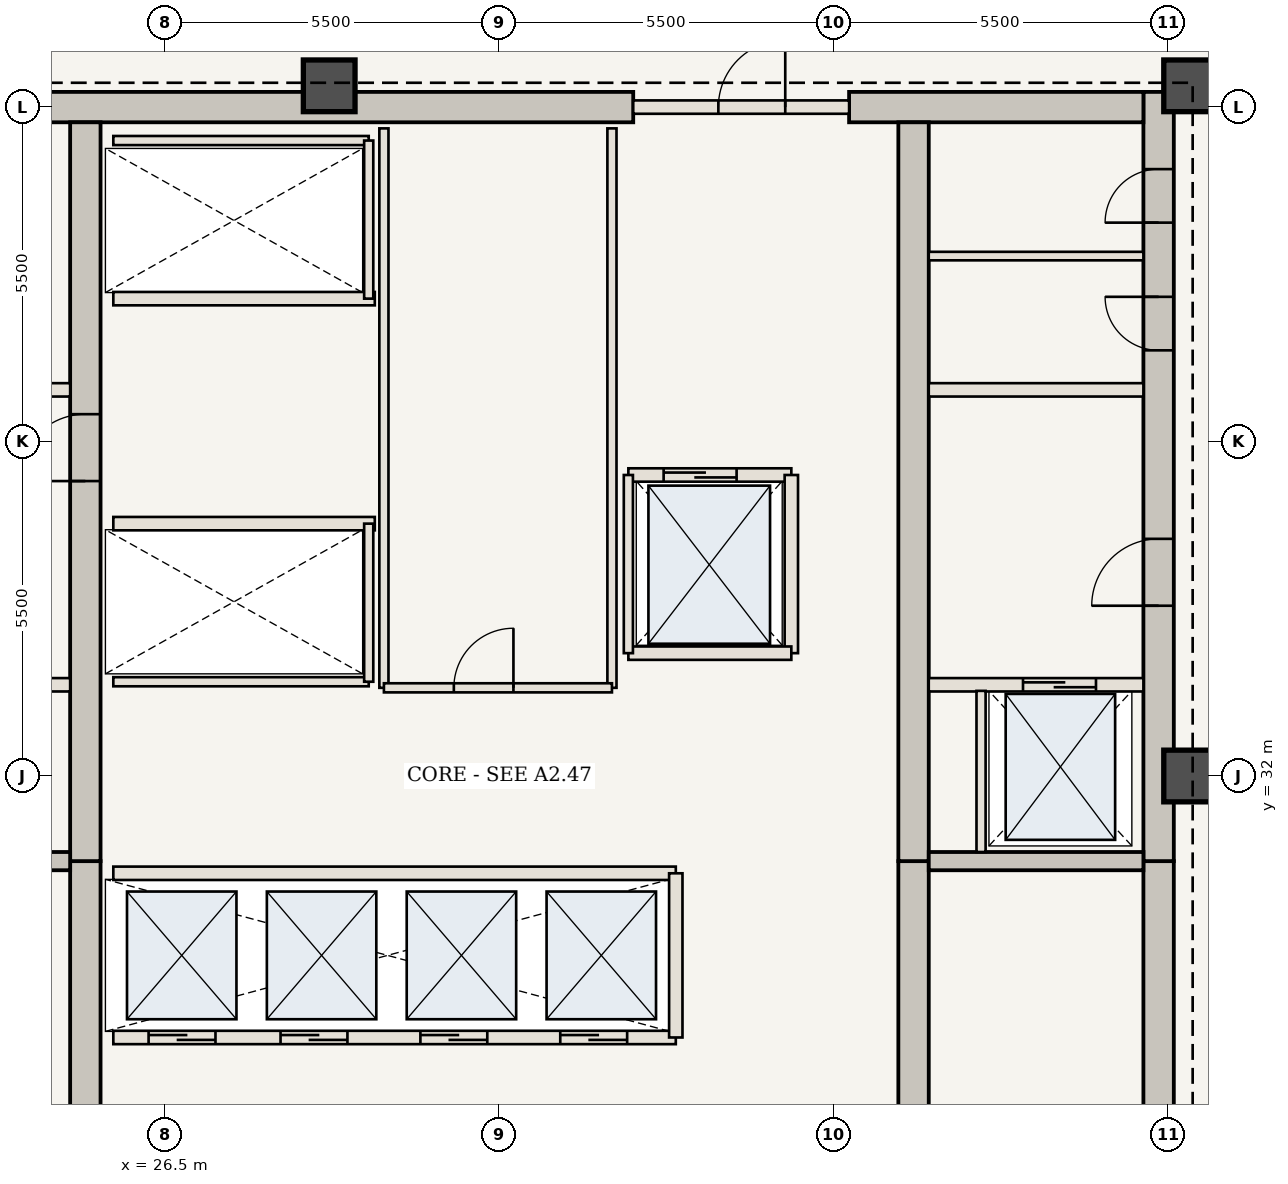
"""IFC4 building model, lengths in metres.
Left out: names, types, materials, properties, quantities, classifications, styles, units other than length and angle.
Written with IfcOpenShell. Run it as: python <this file> out.ifc"""

import sys

from ifc_helpers import new_model, si_unit, direction, frame, frame_2d, origin, origin_2d, place, context, subcontext, project, spatial, rectangle, extrude, element, fill, save


model = new_model("IFC4")
c1 = context("Model", 3, precision=1e-05, world=origin(), true_north=direction((0.0, 1.0)))
c2 = subcontext(c1, "Body", "Model", "MODEL_VIEW")
j1 = project(units=[si_unit("LENGTHUNIT", "METRE"), si_unit("PLANEANGLEUNIT", "RADIAN")], contexts=[c1])
p1 = place(None, origin())
s1 = spatial("IfcSite", under=j1, at=p1, CompositionType="ELEMENT")
p2 = place(p1, origin())
s2 = spatial("IfcBuilding", under=s1, at=p2, CompositionType="ELEMENT")
p3 = place(p2, frame((0.0, 0.0, 210.0)))
s3 = spatial("IfcBuildingStorey", under=s2, at=p3, CompositionType="ELEMENT", Elevation=210.0)
p4 = place(p3, frame((42.84, 20.7, 0.0), z_axis=(0.0, 0.0, 1.0), x_axis=(0.0, 1.0, 0.0)))
e1 = element("IfcWall", 1, at=p4, inside=s3, PredefinedType="SHEAR", context=c2, shape_type="SweptSolid", body=[
    extrude(rectangle(XDim=9.9, YDim=0.5, at=frame_2d((4.95, 0.0))), origin(), (0.0, 0.0, 1.0), 3.85),
])
p5 = place(p4, frame((1.05, 0.0, 0.0)))
e2 = element("IfcOpeningElement", 2, at=p5, cuts=e1, PredefinedType="OPENING", context=c2, shape_type="SweptSolid", body=[
    extrude(rectangle(XDim=1.15, YDim=2.15, at=frame_2d((0.575, 1.075))), frame((0.0, 0.26, 0.0), z_axis=(0.0, -1.0, 0.0), x_axis=(1.0, 0.0, 0.0)), (0.0, 0.0, 1.0), 0.52),
])
p6 = place(p3, frame((42.84, 30.6, 0.0), z_axis=(0.0, 0.0, 1.0), x_axis=(0.0, 1.0, 0.0)))
e3 = element("IfcWall", 3, at=p6, inside=s3, PredefinedType="SHEAR", context=c2, shape_type="SweptSolid", body=[
    extrude(rectangle(XDim=12.65, YDim=0.5, at=frame_2d((6.325, 0.0))), origin(), (0.0, 0.0, 1.0), 3.85),
])
p7 = place(p6, frame((4.2, 0.0, 0.0)))
e4 = element("IfcOpeningElement", 4, at=p7, cuts=e3, PredefinedType="OPENING", context=c2, shape_type="SweptSolid", body=[
    extrude(rectangle(XDim=1.1, YDim=2.15, at=frame_2d((0.55, 1.075))), frame((0.0, 0.26, 0.0), z_axis=(0.0, -1.0, 0.0), x_axis=(1.0, 0.0, 0.0)), (0.0, 0.0, 1.0), 0.52),
])
p8 = place(p6, frame((8.4, 0.0, 0.0)))
e5 = element("IfcOpeningElement", 5, at=p8, cuts=e3, PredefinedType="OPENING", context=c2, shape_type="SweptSolid", body=[
    extrude(rectangle(XDim=0.88, YDim=2.1, at=frame_2d((0.44, 1.05))), frame((0.0, 0.26, 0.0), z_axis=(0.0, -1.0, 0.0), x_axis=(1.0, 0.0, 0.0)), (0.0, 0.0, 1.0), 0.52),
])
p9 = place(p6, frame((10.5, 0.0, 0.0)))
e6 = element("IfcOpeningElement", 6, at=p9, cuts=e3, PredefinedType="OPENING", context=c2, shape_type="SweptSolid", body=[
    extrude(rectangle(XDim=0.88, YDim=2.1, at=frame_2d((0.44, 1.05))), frame((0.0, 0.26, 0.0), z_axis=(0.0, -1.0, 0.0), x_axis=(1.0, 0.0, 0.0)), (0.0, 0.0, 1.0), 0.52),
])
p10 = place(p3, frame((21.41, 43.0, 0.0), z_axis=(0.0, 0.0, 1.0), x_axis=(1.0, 0.0, 0.0)))
e7 = element("IfcWall", 7, at=p10, inside=s3, PredefinedType="SHEAR", context=c2, shape_type="SweptSolid", body=[
    extrude(rectangle(XDim=12.79, YDim=0.5, at=frame_2d((6.395, 0.0))), origin(), (0.0, 0.0, 1.0), 3.85),
])
p11 = place(p3, frame((37.75, 43.0, 0.0), z_axis=(0.0, 0.0, 1.0), x_axis=(1.0, 0.0, 0.0)))
e8 = element("IfcWall", 8, at=p11, inside=s3, PredefinedType="SHEAR", context=c2, shape_type="SweptSolid", body=[
    extrude(rectangle(XDim=4.84, YDim=0.5, at=frame_2d((2.42, 0.0))), origin(), (0.0, 0.0, 1.0), 3.85),
])
p12 = place(p3, frame((25.19, 21.2, 0.0), z_axis=(0.0, 0.0, 1.0), x_axis=(0.0, 1.0, 0.0)))
e9 = element("IfcWall", 9, at=p12, inside=s3, PredefinedType="SHEAR", context=c2, shape_type="SweptSolid", body=[
    extrude(rectangle(XDim=9.4, YDim=0.5, at=frame_2d((4.7, 0.0))), origin(), (0.0, 0.0, 1.0), 3.85),
])
p13 = place(p3, frame((25.19, 30.6, 0.0), z_axis=(0.0, 0.0, 1.0), x_axis=(0.0, 1.0, 0.0)))
e10 = element("IfcWall", 10, at=p13, inside=s3, PredefinedType="SHEAR", context=c2, shape_type="SweptSolid", body=[
    extrude(rectangle(XDim=12.15, YDim=0.5, at=frame_2d((6.075, 0.0))), origin(), (0.0, 0.0, 1.0), 3.85),
])
p14 = place(p13, frame((6.25, 0.0, 0.0)))
e11 = element("IfcOpeningElement", 11, at=p14, cuts=e10, PredefinedType="OPENING", context=c2, shape_type="SweptSolid", body=[
    extrude(rectangle(XDim=1.1, YDim=2.15, at=frame_2d((0.55, 1.075))), frame((0.0, 0.26, 0.0), z_axis=(0.0, -1.0, 0.0), x_axis=(1.0, 0.0, 0.0)), (0.0, 0.0, 1.0), 0.52),
])
p15 = place(p3, frame((38.81, 21.2, 0.0), z_axis=(0.0, 0.0, 1.0), x_axis=(0.0, 1.0, 0.0)))
e12 = element("IfcWall", 12, at=p15, inside=s3, PredefinedType="SHEAR", context=c2, shape_type="SweptSolid", body=[
    extrude(rectangle(XDim=9.4, YDim=0.5, at=frame_2d((4.7, 0.0))), origin(), (0.0, 0.0, 1.0), 3.85),
])
p16 = place(p3, frame((38.81, 30.6, 0.0), z_axis=(0.0, 0.0, 1.0), x_axis=(0.0, 1.0, 0.0)))
e13 = element("IfcWall", 13, at=p16, inside=s3, PredefinedType="SHEAR", context=c2, shape_type="SweptSolid", body=[
    extrude(rectangle(XDim=12.15, YDim=0.5, at=frame_2d((6.075, 0.0))), origin(), (0.0, 0.0, 1.0), 3.85),
])
for number, where, z_axis, x_axis in (
    (14, (43.35, 32.0, 0.0), (0.0, 0.0, 1.0), (1.0, 0.0, 0.0)),
    (15, (43.35, 43.35, 0.0), (0.0, 0.0, 1.0), (1.0, 0.0, 0.0)),
    (16, (29.2, 43.35, 0.0), (0.0, 0.0, 1.0), (1.0, 0.0, 0.0)),
):
    element("IfcColumn", number, at=place(p3, frame(where, z_axis=z_axis, x_axis=x_axis)), inside=s3, PredefinedType="COLUMN", context=c2, shape_type="SweptSolid", body=[
        extrude(rectangle(XDim=0.85, YDim=0.85, at=origin_2d()), origin(), (0.0, 0.0, 1.0), 3.85),
    ])
for number, where, z_axis, x_axis in (
    (17, (21.41, 30.6, 0.0), (0.0, 0.0, 1.0), (1.0, 0.0, 0.0)),
    (18, (39.06, 30.6, 0.0), (0.0, 0.0, 1.0), (1.0, 0.0, 0.0)),
):
    element("IfcWall", number, at=place(p3, frame(where, z_axis=z_axis, x_axis=x_axis)), inside=s3, PredefinedType="SHEAR", context=c2, shape_type="SweptSolid", body=[
        extrude(rectangle(XDim=3.53, YDim=0.3, at=frame_2d((1.765, 0.0))), origin(), (0.0, 0.0, 1.0), 3.685),
    ])
p17 = place(p3, frame((21.41, 33.5, 0.0), z_axis=(0.0, 0.0, 1.0), x_axis=(1.0, 0.0, 0.0)))
e19 = element("IfcWall", 19, at=p17, inside=s3, PredefinedType="STANDARD", context=c2, shape_type="SweptSolid", body=[
    extrude(rectangle(XDim=3.53, YDim=0.22, at=frame_2d((1.765, 0.0))), origin(), (0.0, 0.0, 1.0), 3.685),
])
p18 = place(p17, frame((0.75, 0.0, 0.0)))
e20 = element("IfcOpeningElement", 20, at=p18, cuts=e19, PredefinedType="OPENING", context=c2, shape_type="SweptSolid", body=[
    extrude(rectangle(XDim=1.2, YDim=2.2, at=frame_2d((0.6, 1.1))), frame((0.0, 0.12, 0.0), z_axis=(0.0, -1.0, 0.0), x_axis=(1.0, 0.0, 0.0)), (0.0, 0.0, 1.0), 0.24),
])
p19 = place(p3, frame((39.06, 33.5, 0.0), z_axis=(0.0, 0.0, 1.0), x_axis=(1.0, 0.0, 0.0)))
e21 = element("IfcWall", 21, at=p19, inside=s3, PredefinedType="STANDARD", context=c2, shape_type="SweptSolid", body=[
    extrude(rectangle(XDim=3.53, YDim=0.22, at=frame_2d((1.765, 0.0))), origin(), (0.0, 0.0, 1.0), 3.685),
])
p20 = place(p19, frame((1.55, 0.0, 0.0)))
e22 = element("IfcOpeningElement", 22, at=p20, cuts=e21, PredefinedType="OPENING", context=c2, shape_type="SweptSolid", body=[
    extrude(rectangle(XDim=1.2, YDim=2.2, at=frame_2d((0.6, 1.1))), frame((0.0, 0.12, 0.0), z_axis=(0.0, -1.0, 0.0), x_axis=(1.0, 0.0, 0.0)), (0.0, 0.0, 1.0), 0.24),
])
p21 = place(p3, frame((39.92, 30.75, 0.0), z_axis=(0.0, 0.0, 1.0), x_axis=(0.0, 1.0, 0.0)))
e23 = element("IfcWall", 23, at=p21, inside=s3, PredefinedType="STANDARD", context=c2, shape_type="SweptSolid", body=[
    extrude(rectangle(XDim=2.65, YDim=0.15, at=frame_2d((1.325, 0.0))), origin(), (0.0, 0.0, 1.0), 3.685),
])
for number, where, z_axis, x_axis in (
    (24, (21.41, 38.35, 0.0), (0.0, 0.0, 1.0), (1.0, 0.0, 0.0)),
    (25, (39.06, 38.35, 0.0), (0.0, 0.0, 1.0), (1.0, 0.0, 0.0)),
):
    element("IfcWall", number, at=place(p3, frame(where, z_axis=z_axis, x_axis=x_axis)), inside=s3, PredefinedType="STANDARD", context=c2, shape_type="SweptSolid", body=[
        extrude(rectangle(XDim=3.53, YDim=0.22, at=frame_2d((1.765, 0.0))), origin(), (0.0, 0.0, 1.0), 3.685),
    ])
p22 = place(p3, frame((39.06, 40.55, 0.0), z_axis=(0.0, 0.0, 1.0), x_axis=(1.0, 0.0, 0.0)))
e26 = element("IfcWall", 26, at=p22, inside=s3, PredefinedType="STANDARD", context=c2, shape_type="SweptSolid", body=[
    extrude(rectangle(XDim=3.53, YDim=0.14, at=frame_2d((1.765, 0.0))), origin(), (0.0, 0.0, 1.0), 3.685),
])
p23 = place(p3, frame((25.65, 27.7, 0.0), z_axis=(0.0, 0.0, 1.0), x_axis=(1.0, 0.0, 0.0)))
e27 = element("IfcWall", 27, at=p23, inside=s3, PredefinedType="STANDARD", context=c2, shape_type="SweptSolid", body=[
    extrude(rectangle(XDim=9.25, YDim=0.22, at=frame_2d((4.625, 0.0))), origin(), (0.0, 0.0, 1.0), 3.685),
])
p24 = place(p23, frame((0.58, 0.0, 0.0)))
e28 = element("IfcOpeningElement", 28, at=p24, cuts=e27, PredefinedType="OPENING", context=c2, shape_type="SweptSolid", body=[
    extrude(rectangle(XDim=1.1, YDim=2.15, at=frame_2d((0.55, 1.075))), frame((0.0, 0.12, 0.0), z_axis=(0.0, -1.0, 0.0), x_axis=(1.0, 0.0, 0.0)), (0.0, 0.0, 1.0), 0.24),
])
p25 = place(p23, frame((2.75, 0.0, 0.0)))
e29 = element("IfcOpeningElement", 29, at=p25, cuts=e27, PredefinedType="OPENING", context=c2, shape_type="SweptSolid", body=[
    extrude(rectangle(XDim=1.1, YDim=2.15, at=frame_2d((0.55, 1.075))), frame((0.0, 0.12, 0.0), z_axis=(0.0, -1.0, 0.0), x_axis=(1.0, 0.0, 0.0)), (0.0, 0.0, 1.0), 0.24),
])
p26 = place(p23, frame((5.05, 0.0, 0.0)))
e30 = element("IfcOpeningElement", 30, at=p26, cuts=e27, PredefinedType="OPENING", context=c2, shape_type="SweptSolid", body=[
    extrude(rectangle(XDim=1.1, YDim=2.15, at=frame_2d((0.55, 1.075))), frame((0.0, 0.12, 0.0), z_axis=(0.0, -1.0, 0.0), x_axis=(1.0, 0.0, 0.0)), (0.0, 0.0, 1.0), 0.24),
])
p27 = place(p23, frame((7.35, 0.0, 0.0)))
e31 = element("IfcOpeningElement", 31, at=p27, cuts=e27, PredefinedType="OPENING", context=c2, shape_type="SweptSolid", body=[
    extrude(rectangle(XDim=1.1, YDim=2.15, at=frame_2d((0.55, 1.075))), frame((0.0, 0.12, 0.0), z_axis=(0.0, -1.0, 0.0), x_axis=(1.0, 0.0, 0.0)), (0.0, 0.0, 1.0), 0.24),
])
p28 = place(p3, frame((25.65, 30.4, 0.0), z_axis=(0.0, 0.0, 1.0), x_axis=(1.0, 0.0, 0.0)))
e32 = element("IfcWall", 32, at=p28, inside=s3, PredefinedType="STANDARD", context=c2, shape_type="SweptSolid", body=[
    extrude(rectangle(XDim=9.25, YDim=0.22, at=frame_2d((4.625, 0.0))), origin(), (0.0, 0.0, 1.0), 3.685),
])
p29 = place(p3, frame((34.9, 27.7, 0.0), z_axis=(0.0, 0.0, 1.0), x_axis=(0.0, 1.0, 0.0)))
e33 = element("IfcWall", 33, at=p29, inside=s3, PredefinedType="STANDARD", context=c2, shape_type="SweptSolid", body=[
    extrude(rectangle(XDim=2.7, YDim=0.22, at=frame_2d((1.35, 0.0))), origin(), (0.0, 0.0, 1.0), 3.685),
])
p30 = place(p3, frame((25.65, 36.15, 0.0), z_axis=(0.0, 0.0, 1.0), x_axis=(1.0, 0.0, 0.0)))
e34 = element("IfcWall", 34, at=p30, inside=s3, PredefinedType="STANDARD", context=c2, shape_type="SweptSolid", body=[
    extrude(rectangle(XDim=4.3, YDim=0.22, at=frame_2d((2.15, 0.0))), origin(), (0.0, 0.0, 1.0), 3.685),
])
p31 = place(p3, frame((25.65, 33.55, 0.0), z_axis=(0.0, 0.0, 1.0), x_axis=(1.0, 0.0, 0.0)))
e35 = element("IfcWall", 35, at=p31, inside=s3, PredefinedType="STANDARD", context=c2, shape_type="SweptSolid", body=[
    extrude(rectangle(XDim=4.2, YDim=0.15, at=frame_2d((2.1, 0.0))), origin(), (0.0, 0.0, 1.0), 3.685),
])
p32 = place(p3, frame((29.85, 33.55, 0.0), z_axis=(0.0, 0.0, 1.0), x_axis=(0.0, 1.0, 0.0)))
e36 = element("IfcWall", 36, at=p32, inside=s3, PredefinedType="STANDARD", context=c2, shape_type="SweptSolid", body=[
    extrude(rectangle(XDim=2.6, YDim=0.15, at=frame_2d((1.3, 0.0))), origin(), (0.0, 0.0, 1.0), 3.685),
])
p33 = place(p3, frame((25.65, 39.85, 0.0), z_axis=(0.0, 0.0, 1.0), x_axis=(1.0, 0.0, 0.0)))
e37 = element("IfcWall", 37, at=p33, inside=s3, PredefinedType="STANDARD", context=c2, shape_type="SweptSolid", body=[
    extrude(rectangle(XDim=4.3, YDim=0.22, at=frame_2d((2.15, 0.0))), origin(), (0.0, 0.0, 1.0), 3.685),
])
p34 = place(p3, frame((25.65, 42.45, 0.0), z_axis=(0.0, 0.0, 1.0), x_axis=(1.0, 0.0, 0.0)))
e38 = element("IfcWall", 38, at=p34, inside=s3, PredefinedType="STANDARD", context=c2, shape_type="SweptSolid", body=[
    extrude(rectangle(XDim=4.2, YDim=0.15, at=frame_2d((2.1, 0.0))), origin(), (0.0, 0.0, 1.0), 3.685),
])
p35 = place(p3, frame((29.85, 39.85, 0.0), z_axis=(0.0, 0.0, 1.0), x_axis=(0.0, 1.0, 0.0)))
e39 = element("IfcWall", 39, at=p35, inside=s3, PredefinedType="STANDARD", context=c2, shape_type="SweptSolid", body=[
    extrude(rectangle(XDim=2.6, YDim=0.15, at=frame_2d((1.3, 0.0))), origin(), (0.0, 0.0, 1.0), 3.685),
])
for number, where, z_axis, x_axis in (
    (40, (30.1, 33.45, 0.0), (0.0, 0.0, 1.0), (0.0, 1.0, 0.0)),
    (41, (33.85, 33.45, 0.0), (0.0, 0.0, 1.0), (0.0, 1.0, 0.0)),
):
    element("IfcWall", number, at=place(p3, frame(where, z_axis=z_axis, x_axis=x_axis)), inside=s3, PredefinedType="STANDARD", context=c2, shape_type="SweptSolid", body=[
        extrude(rectangle(XDim=9.2, YDim=0.15, at=frame_2d((4.6, 0.0))), origin(), (0.0, 0.0, 1.0), 3.685),
    ])
p36 = place(p3, frame((30.1, 33.45, 0.0), z_axis=(0.0, 0.0, 1.0), x_axis=(1.0, 0.0, 0.0)))
e42 = element("IfcWall", 42, at=p36, inside=s3, PredefinedType="STANDARD", context=c2, shape_type="SweptSolid", body=[
    extrude(rectangle(XDim=3.75, YDim=0.15, at=frame_2d((1.875, 0.0))), origin(), (0.0, 0.0, 1.0), 3.685),
])
p37 = place(p36, frame((1.15, 0.0, 0.0)))
e43 = element("IfcOpeningElement", 43, at=p37, cuts=e42, PredefinedType="OPENING", context=c2, shape_type="SweptSolid", body=[
    extrude(rectangle(XDim=0.98, YDim=2.2, at=frame_2d((0.49, 1.1))), frame((0.0, 0.085, 0.0), z_axis=(0.0, -1.0, 0.0), x_axis=(1.0, 0.0, 0.0)), (0.0, 0.0, 1.0), 0.17),
])
p38 = place(p3, frame((34.2, 43.0, 0.0), z_axis=(0.0, 0.0, 1.0), x_axis=(1.0, 0.0, 0.0)))
e44 = element("IfcWall", 44, at=p38, inside=s3, PredefinedType="STANDARD", context=c2, shape_type="SweptSolid", body=[
    extrude(rectangle(XDim=3.55, YDim=0.22, at=frame_2d((1.775, 0.0))), origin(), (0.0, 0.0, 1.0), 3.685),
])
p39 = place(p38, frame((1.4, 0.0, 0.0)))
e45 = element("IfcOpeningElement", 45, at=p39, cuts=e44, PredefinedType="OPENING", context=c2, shape_type="SweptSolid", body=[
    extrude(rectangle(XDim=1.1, YDim=2.15, at=frame_2d((0.55, 1.075))), frame((0.0, 0.12, 0.0), z_axis=(0.0, -1.0, 0.0), x_axis=(1.0, 0.0, 0.0)), (0.0, 0.0, 1.0), 0.24),
])
p40 = place(p3, frame((34.12, 36.95, 0.0), z_axis=(0.0, 0.0, 1.0), x_axis=(1.0, 0.0, 0.0)))
e46 = element("IfcWall", 46, at=p40, inside=s3, PredefinedType="STANDARD", context=c2, shape_type="SweptSolid", body=[
    extrude(rectangle(XDim=2.68, YDim=0.22, at=frame_2d((1.34, 0.0))), origin(), (0.0, 0.0, 1.0), 3.685),
])
p41 = place(p40, frame((0.58, 0.0, 0.0)))
e47 = element("IfcOpeningElement", 47, at=p41, cuts=e46, PredefinedType="OPENING", context=c2, shape_type="SweptSolid", body=[
    extrude(rectangle(XDim=1.2, YDim=2.2, at=frame_2d((0.6, 1.1))), frame((0.0, 0.12, 0.0), z_axis=(0.0, -1.0, 0.0), x_axis=(1.0, 0.0, 0.0)), (0.0, 0.0, 1.0), 0.24),
])
p42 = place(p3, frame((36.8, 34.02, 0.0), z_axis=(0.0, 0.0, 1.0), x_axis=(0.0, 1.0, 0.0)))
e48 = element("IfcWall", 48, at=p42, inside=s3, PredefinedType="STANDARD", context=c2, shape_type="SweptSolid", body=[
    extrude(rectangle(XDim=2.93, YDim=0.22, at=frame_2d((1.465, 0.0))), origin(), (0.0, 0.0, 1.0), 3.685),
])
p43 = place(p3, frame((34.12, 34.02, 0.0), z_axis=(0.0, 0.0, 1.0), x_axis=(1.0, 0.0, 0.0)))
e49 = element("IfcWall", 49, at=p43, inside=s3, PredefinedType="STANDARD", context=c2, shape_type="SweptSolid", body=[
    extrude(rectangle(XDim=2.68, YDim=0.22, at=frame_2d((1.34, 0.0))), origin(), (0.0, 0.0, 1.0), 3.685),
])
p44 = place(p3, frame((34.12, 34.02, 0.0), z_axis=(0.0, 0.0, 1.0), x_axis=(0.0, 1.0, 0.0)))
e50 = element("IfcWall", 50, at=p44, inside=s3, PredefinedType="STANDARD", context=c2, shape_type="SweptSolid", body=[
    extrude(rectangle(XDim=2.93, YDim=0.15, at=frame_2d((1.465, 0.0))), origin(), (0.0, 0.0, 1.0), 3.685),
])
p45 = place(p7, origin())
e51 = element("IfcDoor", 51, at=p45, inside=s3, OperationType="SINGLE_SWING_LEFT", PredefinedType="DOOR", context=c2, shape_type="SweptSolid", body=[
    extrude(rectangle(XDim=1.1, YDim=2.15, at=frame_2d((0.55, 1.075))), frame((0.0, 0.025, 0.0), z_axis=(0.0, -1.0, 0.0), x_axis=(1.0, 0.0, 0.0)), (0.0, 0.0, 1.0), 0.05),
])
fill(e4, e51)
p46 = place(p14, origin())
e52 = element("IfcDoor", 52, at=p46, inside=s3, OperationType="SINGLE_SWING_LEFT", PredefinedType="DOOR", context=c2, shape_type="SweptSolid", body=[
    extrude(rectangle(XDim=1.1, YDim=2.15, at=frame_2d((0.55, 1.075))), frame((0.0, 0.025, 0.0), z_axis=(0.0, -1.0, 0.0), x_axis=(1.0, 0.0, 0.0)), (0.0, 0.0, 1.0), 0.05),
])
fill(e11, e52)
p47 = place(p8, origin())
e53 = element("IfcDoor", 53, at=p47, inside=s3, OperationType="SINGLE_SWING_RIGHT", PredefinedType="DOOR", context=c2, shape_type="SweptSolid", body=[
    extrude(rectangle(XDim=0.88, YDim=2.1, at=frame_2d((0.44, 1.05))), frame((0.0, 0.025, 0.0), z_axis=(0.0, -1.0, 0.0), x_axis=(1.0, 0.0, 0.0)), (0.0, 0.0, 1.0), 0.05),
])
fill(e5, e53)
p48 = place(p9, origin())
e54 = element("IfcDoor", 54, at=p48, inside=s3, OperationType="SINGLE_SWING_LEFT", PredefinedType="DOOR", context=c2, shape_type="SweptSolid", body=[
    extrude(rectangle(XDim=0.88, YDim=2.1, at=frame_2d((0.44, 1.05))), frame((0.0, 0.025, 0.0), z_axis=(0.0, -1.0, 0.0), x_axis=(1.0, 0.0, 0.0)), (0.0, 0.0, 1.0), 0.05),
])
fill(e6, e54)
p49 = place(p20, origin())
e55 = element("IfcDoor", 55, at=p49, inside=s3, OperationType="DOUBLE_DOOR_SLIDING", PredefinedType="DOOR", context=c2, shape_type="SweptSolid", body=[
    extrude(rectangle(XDim=1.2, YDim=2.2, at=frame_2d((0.6, 1.1))), frame((0.0, 0.025, 0.0), z_axis=(0.0, -1.0, 0.0), x_axis=(1.0, 0.0, 0.0)), (0.0, 0.0, 1.0), 0.05),
])
fill(e22, e55)
p50 = place(p24, origin())
e56 = element("IfcDoor", 56, at=p50, inside=s3, OperationType="DOUBLE_DOOR_SLIDING", PredefinedType="DOOR", context=c2, shape_type="SweptSolid", body=[
    extrude(rectangle(XDim=1.1, YDim=2.15, at=frame_2d((0.55, 1.075))), frame((0.0, 0.025, 0.0), z_axis=(0.0, -1.0, 0.0), x_axis=(1.0, 0.0, 0.0)), (0.0, 0.0, 1.0), 0.05),
])
fill(e28, e56)
p51 = place(p25, origin())
e57 = element("IfcDoor", 57, at=p51, inside=s3, OperationType="DOUBLE_DOOR_SLIDING", PredefinedType="DOOR", context=c2, shape_type="SweptSolid", body=[
    extrude(rectangle(XDim=1.1, YDim=2.15, at=frame_2d((0.55, 1.075))), frame((0.0, 0.025, 0.0), z_axis=(0.0, -1.0, 0.0), x_axis=(1.0, 0.0, 0.0)), (0.0, 0.0, 1.0), 0.05),
])
fill(e29, e57)
p52 = place(p26, origin())
e58 = element("IfcDoor", 58, at=p52, inside=s3, OperationType="DOUBLE_DOOR_SLIDING", PredefinedType="DOOR", context=c2, shape_type="SweptSolid", body=[
    extrude(rectangle(XDim=1.1, YDim=2.15, at=frame_2d((0.55, 1.075))), frame((0.0, 0.025, 0.0), z_axis=(0.0, -1.0, 0.0), x_axis=(1.0, 0.0, 0.0)), (0.0, 0.0, 1.0), 0.05),
])
fill(e30, e58)
p53 = place(p27, origin())
e59 = element("IfcDoor", 59, at=p53, inside=s3, OperationType="DOUBLE_DOOR_SLIDING", PredefinedType="DOOR", context=c2, shape_type="SweptSolid", body=[
    extrude(rectangle(XDim=1.1, YDim=2.15, at=frame_2d((0.55, 1.075))), frame((0.0, 0.025, 0.0), z_axis=(0.0, -1.0, 0.0), x_axis=(1.0, 0.0, 0.0)), (0.0, 0.0, 1.0), 0.05),
])
fill(e31, e59)
p54 = place(p37, origin())
e60 = element("IfcDoor", 60, at=p54, inside=s3, OperationType="SINGLE_SWING_RIGHT", PredefinedType="DOOR", context=c2, shape_type="SweptSolid", body=[
    extrude(rectangle(XDim=0.98, YDim=2.2, at=frame_2d((0.49, 1.1))), frame((0.0, 0.025, 0.0), z_axis=(0.0, -1.0, 0.0), x_axis=(1.0, 0.0, 0.0)), (0.0, 0.0, 1.0), 0.05),
])
fill(e43, e60)
p55 = place(p39, origin())
e61 = element("IfcDoor", 61, at=p55, inside=s3, OperationType="SINGLE_SWING_RIGHT", PredefinedType="DOOR", context=c2, shape_type="SweptSolid", body=[
    extrude(rectangle(XDim=1.1, YDim=2.15, at=frame_2d((0.55, 1.075))), frame((0.0, 0.025, 0.0), z_axis=(0.0, -1.0, 0.0), x_axis=(1.0, 0.0, 0.0)), (0.0, 0.0, 1.0), 0.05),
])
fill(e45, e61)
p56 = place(p41, origin())
e62 = element("IfcDoor", 62, at=p56, inside=s3, OperationType="DOUBLE_DOOR_SLIDING", PredefinedType="DOOR", context=c2, shape_type="SweptSolid", body=[
    extrude(rectangle(XDim=1.2, YDim=2.2, at=frame_2d((0.6, 1.1))), frame((0.0, 0.025, 0.0), z_axis=(0.0, -1.0, 0.0), x_axis=(1.0, 0.0, 0.0)), (0.0, 0.0, 1.0), 0.05),
])
fill(e47, e62)
save(model, sys.argv[1])
